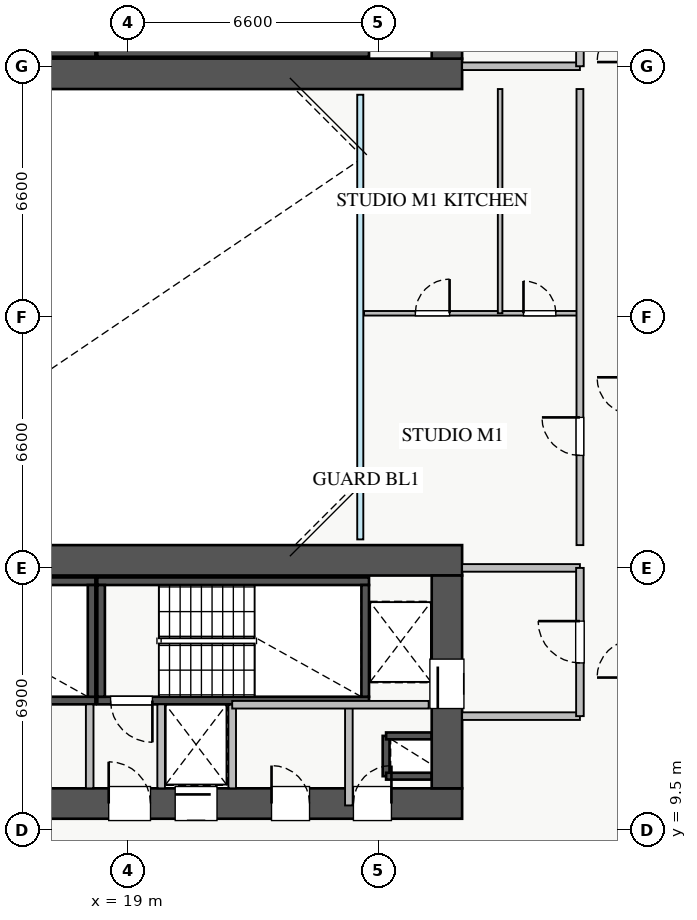
"""IFC4 building model, lengths in metres.
Left out: names, types, materials, properties, quantities, classifications, styles, units other than length and angle.
Written with IfcOpenShell. Run it as: python <this file> out.ifc"""

import sys

from ifc_helpers import new_model, si_unit, direction, frame, frame_2d, origin, place, context, subcontext, project, spatial, rectangle, extrude, source, transform, mapped, element, fill, save


model = new_model("IFC4")
c1 = context("Model", 3, precision=1e-05, world=origin(), true_north=direction((0.0, 1.0)))
c2 = subcontext(c1, "Body", "Model", "MODEL_VIEW")
j1 = project(units=[si_unit("LENGTHUNIT", "METRE"), si_unit("PLANEANGLEUNIT", "RADIAN")], contexts=[c1])
p1 = place(None, origin())
s1 = spatial("IfcSite", under=j1, at=p1, CompositionType="ELEMENT")
p2 = place(p1, origin())
s2 = spatial("IfcBuilding", under=s1, at=p2, CompositionType="ELEMENT")
p3 = place(p2, frame((0.0, 0.0, 39.25)))
s3 = spatial("IfcBuildingStorey", under=s2, at=p3, CompositionType="ELEMENT", Elevation=39.25)
p4 = place(p3, frame((25.8, 10.92, 0.0), z_axis=(0.0, 0.0, 1.0), x_axis=(0.0, 1.0, 0.0)))
e1 = element("IfcWall", 1, at=p4, inside=s3, PredefinedType="SHEAR", context=c2, shape_type="SweptSolid", body=[
    extrude(rectangle(XDim=1.06, YDim=0.18, at=frame_2d((0.53, 0.0))), origin(), (0.0, 0.0, 1.0), 3.07),
])
for number, where, z_axis, x_axis in (
    (2, (25.8, 11.98, 0.0), (0.0, 0.0, 1.0), (1.0, 0.0, 0.0)),
    (3, (25.8, 10.92, 0.0), (0.0, 0.0, 1.0), (1.0, 0.0, 0.0)),
):
    element("IfcWall", number, at=place(p3, frame(where, z_axis=z_axis, x_axis=x_axis)), inside=s3, PredefinedType="SHEAR", context=c2, shape_type="SweptSolid", body=[
        extrude(rectangle(XDim=1.2, YDim=0.18, at=frame_2d((0.6, 0.0))), origin(), (0.0, 0.0, 1.0), 3.07),
    ])
p5 = place(p3, frame((19.88, 12.8, 0.0), z_axis=(0.0, 0.0, 1.0), x_axis=(1.0, 0.0, 0.0)))
e4 = element("IfcWall", 4, at=p5, inside=s3, PredefinedType="SHEAR", context=c2, shape_type="SweptSolid", body=[
    extrude(rectangle(XDim=1.87, YDim=0.18, at=frame_2d((0.935, 0.0))), origin(), (0.0, 0.0, 1.0), 3.07),
])
p6 = place(p3, frame((11.0, 29.95, 0.0), z_axis=(0.0, 0.0, 1.0), x_axis=(1.0, 0.0, 0.0)))
e5 = element("IfcWall", 5, at=p6, inside=s3, PredefinedType="SHEAR", context=c2, shape_type="SweptSolid", body=[
    extrude(rectangle(XDim=7.15, YDim=0.2, at=frame_2d((3.575, 0.0))), origin(), (0.0, 0.0, 1.0), 3.25),
])
p7 = place(p3, frame((18.2, 29.95, 0.0), z_axis=(0.0, 0.0, 1.0), x_axis=(1.0, 0.0, 0.0)))
e6 = element("IfcWall", 6, at=p7, inside=s3, PredefinedType="SHEAR", context=c2, shape_type="SweptSolid", body=[
    extrude(rectangle(XDim=7.15, YDim=0.2, at=frame_2d((3.575, 0.0))), origin(), (0.0, 0.0, 1.0), 3.25),
])
p8 = place(p3, frame((11.0, 12.91, 0.0), z_axis=(0.0, 0.0, 1.0), x_axis=(1.0, 0.0, 0.0)))
e7 = element("IfcWall", 7, at=p8, inside=s3, PredefinedType="SHEAR", context=c2, shape_type="SweptSolid", body=[
    extrude(rectangle(XDim=7.15, YDim=0.2, at=frame_2d((3.575, 0.0))), origin(), (0.0, 0.0, 1.0), 3.25),
])
p9 = place(p8, frame((0.35, 0.0, 0.0)))
e8 = element("IfcOpeningElement", 8, at=p9, cuts=e7, PredefinedType="OPENING", context=c2, shape_type="SweptSolid", body=[
    extrude(rectangle(XDim=1.1, YDim=2.05, at=frame_2d((0.55, 1.025))), frame((0.0, 0.11, 0.0), z_axis=(0.0, -1.0, 0.0), x_axis=(1.0, 0.0, 0.0)), (0.0, 0.0, 1.0), 0.22),
])
p10 = place(p3, frame((11.0, 16.05, 0.0), z_axis=(0.0, 0.0, 1.0), x_axis=(1.0, 0.0, 0.0)))
e9 = element("IfcWall", 9, at=p10, inside=s3, PredefinedType="SHEAR", context=c2, shape_type="SweptSolid", body=[
    extrude(rectangle(XDim=7.15, YDim=0.2, at=frame_2d((3.575, 0.0))), origin(), (0.0, 0.0, 1.0), 3.25),
])
p11 = place(p3, frame((18.05, 13.01, 0.0), z_axis=(0.0, 0.0, 1.0), x_axis=(0.0, 1.0, 0.0)))
e10 = element("IfcWall", 10, at=p11, inside=s3, PredefinedType="SHEAR", context=c2, shape_type="SweptSolid", body=[
    extrude(rectangle(XDim=2.94, YDim=0.2, at=frame_2d((1.47, 0.0))), origin(), (0.0, 0.0, 1.0), 3.25),
])
p12 = place(p3, frame((18.2, 12.91, 0.0), z_axis=(0.0, 0.0, 1.0), x_axis=(1.0, 0.0, 0.0)))
e11 = element("IfcWall", 11, at=p12, inside=s3, PredefinedType="SHEAR", context=c2, shape_type="SweptSolid", body=[
    extrude(rectangle(XDim=7.15, YDim=0.2, at=frame_2d((3.575, 0.0))), origin(), (0.0, 0.0, 1.0), 3.25),
])
p13 = place(p12, frame((0.35, 0.0, 0.0)))
e12 = element("IfcOpeningElement", 12, at=p13, cuts=e11, PredefinedType="OPENING", context=c2, shape_type="SweptSolid", body=[
    extrude(rectangle(XDim=1.1, YDim=2.05, at=frame_2d((0.55, 1.025))), frame((0.0, 0.11, 0.0), z_axis=(0.0, -1.0, 0.0), x_axis=(1.0, 0.0, 0.0)), (0.0, 0.0, 1.0), 0.22),
])
p14 = place(p3, frame((18.2, 16.05, 0.0), z_axis=(0.0, 0.0, 1.0), x_axis=(1.0, 0.0, 0.0)))
e13 = element("IfcWall", 13, at=p14, inside=s3, PredefinedType="SHEAR", context=c2, shape_type="SweptSolid", body=[
    extrude(rectangle(XDim=7.15, YDim=0.2, at=frame_2d((3.575, 0.0))), origin(), (0.0, 0.0, 1.0), 3.25),
])
for number, where, z_axis, x_axis in (
    (14, (18.3, 13.01, 0.0), (0.0, 0.0, 1.0), (0.0, 1.0, 0.0)),
    (15, (25.25, 13.01, 0.0), (0.0, 0.0, 1.0), (0.0, 1.0, 0.0)),
):
    element("IfcWall", number, at=place(p3, frame(where, z_axis=z_axis, x_axis=x_axis)), inside=s3, PredefinedType="SHEAR", context=c2, shape_type="SweptSolid", body=[
        extrude(rectangle(XDim=2.94, YDim=0.2, at=frame_2d((1.47, 0.0))), origin(), (0.0, 0.0, 1.0), 3.25),
    ])
p15 = place(p3, frame((10.2, 29.4, 0.0), z_axis=(0.0, 0.0, 1.0), x_axis=(1.0, 0.0, 0.0)))
e16 = element("IfcWall", 16, at=p15, inside=s3, PredefinedType="SHEAR", context=c2, shape_type="SweptSolid", body=[
    extrude(rectangle(XDim=17.6, YDim=0.8, at=frame_2d((8.8, 0.0))), origin(), (0.0, 0.0, 1.0), 3.25),
])
p16 = place(p3, frame((27.4, 29.8, 0.0), z_axis=(0.0, 0.0, 1.0), x_axis=(0.0, 1.0, 0.0)))
e17 = element("IfcWall", 17, at=p16, inside=s3, PredefinedType="SHEAR", context=c2, shape_type="SweptSolid", body=[
    extrude(rectangle(XDim=5.6, YDim=0.8, at=frame_2d((2.8, 0.0))), origin(), (0.0, 0.0, 1.0), 3.25),
])
p17 = place(p16, frame((1.1, 0.0, 0.0)))
e18 = element("IfcOpeningElement", 18, at=p17, cuts=e17, PredefinedType="OPENING", context=c2, shape_type="SweptSolid", body=[
    extrude(rectangle(XDim=1.3, YDim=2.05, at=frame_2d((0.65, 1.025))), frame((0.0, 0.41, 0.0), z_axis=(0.0, -1.0, 0.0), x_axis=(1.0, 0.0, 0.0)), (0.0, 0.0, 1.0), 0.82),
])
p18 = place(p3, frame((10.2, 10.2, 0.0), z_axis=(0.0, 0.0, 1.0), x_axis=(1.0, 0.0, 0.0)))
e19 = element("IfcWall", 19, at=p18, inside=s3, PredefinedType="SHEAR", context=c2, shape_type="SweptSolid", body=[
    extrude(rectangle(XDim=17.6, YDim=0.8, at=frame_2d((8.8, 0.0))), origin(), (0.0, 0.0, 1.0), 3.25),
])
p19 = place(p18, frame((1.15, 0.0, 0.0)))
e20 = element("IfcOpeningElement", 20, at=p19, cuts=e19, PredefinedType="OPENING", context=c2, shape_type="SweptSolid", body=[
    extrude(rectangle(XDim=1.1, YDim=2.05, at=frame_2d((0.55, 1.025))), frame((0.0, 0.41, 0.0), z_axis=(0.0, -1.0, 0.0), x_axis=(1.0, 0.0, 0.0)), (0.0, 0.0, 1.0), 0.82),
])
p20 = place(p18, frame((8.3, 0.0, 0.0)))
e21 = element("IfcOpeningElement", 21, at=p20, cuts=e19, PredefinedType="OPENING", context=c2, shape_type="SweptSolid", body=[
    extrude(rectangle(XDim=1.1, YDim=2.05, at=frame_2d((0.55, 1.025))), frame((0.0, 0.41, 0.0), z_axis=(0.0, -1.0, 0.0), x_axis=(1.0, 0.0, 0.0)), (0.0, 0.0, 1.0), 0.82),
])
p21 = place(p18, frame((10.05, 0.0, 0.0)))
e22 = element("IfcOpeningElement", 22, at=p21, cuts=e19, PredefinedType="OPENING", context=c2, shape_type="SweptSolid", body=[
    extrude(rectangle(XDim=1.1, YDim=2.05, at=frame_2d((0.55, 1.025))), frame((0.0, 0.41, 0.0), z_axis=(0.0, -1.0, 0.0), x_axis=(1.0, 0.0, 0.0)), (0.0, 0.0, 1.0), 0.82),
])
p22 = place(p18, frame((14.74, 0.0, 0.0)))
e23 = element("IfcOpeningElement", 23, at=p22, cuts=e19, PredefinedType="OPENING", context=c2, shape_type="SweptSolid", body=[
    extrude(rectangle(XDim=1.0, YDim=2.05, at=frame_2d((0.5, 1.025))), frame((0.0, 0.41, 0.0), z_axis=(0.0, -1.0, 0.0), x_axis=(1.0, 0.0, 0.0)), (0.0, 0.0, 1.0), 0.82),
])
p23 = place(p18, frame((12.585, 0.0, 0.0)))
e24 = element("IfcOpeningElement", 24, at=p23, cuts=e19, PredefinedType="OPENING", context=c2, shape_type="SweptSolid", body=[
    extrude(rectangle(XDim=1.0, YDim=2.05, at=frame_2d((0.5, 1.025))), frame((0.0, 0.41, 0.0), z_axis=(0.0, -1.0, 0.0), x_axis=(1.0, 0.0, 0.0)), (0.0, 0.0, 1.0), 0.82),
])
p24 = place(p3, frame((10.2, 16.6, 0.0), z_axis=(0.0, 0.0, 1.0), x_axis=(1.0, 0.0, 0.0)))
e25 = element("IfcWall", 25, at=p24, inside=s3, PredefinedType="SHEAR", context=c2, shape_type="SweptSolid", body=[
    extrude(rectangle(XDim=17.6, YDim=0.8, at=frame_2d((8.8, 0.0))), origin(), (0.0, 0.0, 1.0), 3.25),
])
p25 = place(p3, frame((27.4, 10.6, 0.0), z_axis=(0.0, 0.0, 1.0), x_axis=(0.0, 1.0, 0.0)))
e26 = element("IfcWall", 26, at=p25, inside=s3, PredefinedType="SHEAR", context=c2, shape_type="SweptSolid", body=[
    extrude(rectangle(XDim=5.6, YDim=0.8, at=frame_2d((2.8, 0.0))), origin(), (0.0, 0.0, 1.0), 3.25),
])
p26 = place(p25, frame((2.1, 0.0, 0.0)))
e27 = element("IfcOpeningElement", 27, at=p26, cuts=e26, PredefinedType="OPENING", context=c2, shape_type="SweptSolid", body=[
    extrude(rectangle(XDim=1.3, YDim=2.05, at=frame_2d((0.65, 1.025))), frame((0.0, 0.41, 0.0), z_axis=(0.0, -1.0, 0.0), x_axis=(1.0, 0.0, 0.0)), (0.0, 0.0, 1.0), 0.82),
])
p27 = place(p3, frame((27.8, 29.6, 0.0), z_axis=(0.0, 0.0, 1.0), x_axis=(1.0, 0.0, 0.0)))
e28 = element("IfcWall", 28, at=p27, inside=s3, PredefinedType="PARTITIONING", context=c2, shape_type="SweptSolid", body=[
    extrude(rectangle(XDim=3.1, YDim=0.2, at=frame_2d((1.55, 0.0))), origin(), (0.0, 0.0, 1.0), 3.07),
])
p28 = place(p3, frame((30.9, 29.6, 0.0), z_axis=(0.0, 0.0, 1.0), x_axis=(0.0, 1.0, 0.0)))
e29 = element("IfcWall", 29, at=p28, inside=s3, PredefinedType="PARTITIONING", context=c2, shape_type="SweptSolid", body=[
    extrude(rectangle(XDim=3.9, YDim=0.2, at=frame_2d((1.95, 0.0))), origin(), (0.0, 0.0, 1.0), 3.07),
])
p29 = place(p28, frame((1.4, 0.0, 0.0)))
e30 = element("IfcOpeningElement", 30, at=p29, cuts=e29, PredefinedType="OPENING", context=c2, shape_type="SweptSolid", body=[
    extrude(rectangle(XDim=1.1, YDim=2.05, at=frame_2d((0.55, 1.025))), frame((0.0, 0.11, 0.0), z_axis=(0.0, -1.0, 0.0), x_axis=(1.0, 0.0, 0.0)), (0.0, 0.0, 1.0), 0.22),
])
for number, where, z_axis, x_axis in (
    (31, (27.8, 16.4, 0.0), (0.0, 0.0, 1.0), (1.0, 0.0, 0.0)),
    (32, (27.8, 12.5, 0.0), (0.0, 0.0, 1.0), (1.0, 0.0, 0.0)),
):
    element("IfcWall", number, at=place(p3, frame(where, z_axis=z_axis, x_axis=x_axis)), inside=s3, PredefinedType="PARTITIONING", context=c2, shape_type="SweptSolid", body=[
        extrude(rectangle(XDim=3.1, YDim=0.2, at=frame_2d((1.55, 0.0))), origin(), (0.0, 0.0, 1.0), 3.07),
    ])
p30 = place(p3, frame((30.9, 12.5, 0.0), z_axis=(0.0, 0.0, 1.0), x_axis=(0.0, 1.0, 0.0)))
e33 = element("IfcWall", 33, at=p30, inside=s3, PredefinedType="PARTITIONING", context=c2, shape_type="SweptSolid", body=[
    extrude(rectangle(XDim=3.9, YDim=0.2, at=frame_2d((1.95, 0.0))), origin(), (0.0, 0.0, 1.0), 3.07),
])
p31 = place(p30, frame((1.4, 0.0, 0.0)))
e34 = element("IfcOpeningElement", 34, at=p31, cuts=e33, PredefinedType="OPENING", context=c2, shape_type="SweptSolid", body=[
    extrude(rectangle(XDim=1.1, YDim=2.05, at=frame_2d((0.55, 1.025))), frame((0.0, 0.11, 0.0), z_axis=(0.0, -1.0, 0.0), x_axis=(1.0, 0.0, 0.0)), (0.0, 0.0, 1.0), 0.22),
])
for number, where, z_axis, x_axis in (
    (35, (18.0, 10.6, 0.0), (0.0, 0.0, 1.0), (0.0, 1.0, 0.0)),
    (36, (19.88, 10.6, 0.0), (0.0, 0.0, 1.0), (0.0, 1.0, 0.0)),
):
    element("IfcWall", number, at=place(p3, frame(where, z_axis=z_axis, x_axis=x_axis)), inside=s3, PredefinedType="PARTITIONING", context=c2, shape_type="SweptSolid", body=[
        extrude(rectangle(XDim=2.21, YDim=0.2, at=frame_2d((1.105, 0.0))), origin(), (0.0, 0.0, 1.0), 3.07),
    ])
p32 = place(p3, frame((24.82, 10.15, 0.0), z_axis=(0.0, 0.0, 1.0), x_axis=(0.0, 1.0, 0.0)))
e37 = element("IfcWall", 37, at=p32, inside=s3, PredefinedType="PARTITIONING", context=c2, shape_type="SweptSolid", body=[
    extrude(rectangle(XDim=2.65, YDim=0.2, at=frame_2d((1.325, 0.0))), origin(), (0.0, 0.0, 1.0), 3.07),
])
p33 = place(p3, frame((21.75, 10.6, 0.0), z_axis=(0.0, 0.0, 1.0), x_axis=(0.0, 1.0, 0.0)))
e38 = element("IfcWall", 38, at=p33, inside=s3, PredefinedType="PARTITIONING", context=c2, shape_type="SweptSolid", body=[
    extrude(rectangle(XDim=2.2, YDim=0.2, at=frame_2d((1.1, 0.0))), origin(), (0.0, 0.0, 1.0), 3.07),
])
p34 = place(p3, frame((21.75, 12.8, 0.0), z_axis=(0.0, 0.0, 1.0), x_axis=(1.0, 0.0, 0.0)))
e39 = element("IfcWall", 39, at=p34, inside=s3, PredefinedType="PARTITIONING", context=c2, shape_type="SweptSolid", body=[
    extrude(rectangle(XDim=5.17, YDim=0.2, at=frame_2d((2.585, 0.0))), origin(), (0.0, 0.0, 1.0), 3.07),
])
p35 = place(p3, frame((25.22, 23.1, 0.0), z_axis=(0.0, 0.0, 1.0), x_axis=(1.0, 0.0, 0.0)))
e40 = element("IfcWall", 40, at=p35, inside=s3, PredefinedType="PLUMBINGWALL", context=c2, shape_type="SweptSolid", body=[
    extrude(rectangle(XDim=5.68, YDim=0.12, at=frame_2d((2.84, 0.0))), origin(), (0.0, 0.0, 1.0), 3.07),
])
p36 = place(p35, frame((1.35, 0.0, 0.0)))
e41 = element("IfcOpeningElement", 41, at=p36, cuts=e40, PredefinedType="OPENING", context=c2, shape_type="SweptSolid", body=[
    extrude(rectangle(XDim=0.9, YDim=2.05, at=frame_2d((0.45, 1.025))), frame((0.0, 0.07, 0.0), z_axis=(0.0, -1.0, 0.0), x_axis=(1.0, 0.0, 0.0)), (0.0, 0.0, 1.0), 0.14),
])
p37 = place(p35, frame((4.195, 0.0, 0.0)))
e42 = element("IfcOpeningElement", 42, at=p37, cuts=e40, PredefinedType="OPENING", context=c2, shape_type="SweptSolid", body=[
    extrude(rectangle(XDim=0.85, YDim=2.05, at=frame_2d((0.425, 1.025))), frame((0.0, 0.07, 0.0), z_axis=(0.0, -1.0, 0.0), x_axis=(1.0, 0.0, 0.0)), (0.0, 0.0, 1.0), 0.14),
])
p38 = place(p3, frame((28.8, 23.1, 0.0), z_axis=(0.0, 0.0, 1.0), x_axis=(0.0, 1.0, 0.0)))
e43 = element("IfcWall", 43, at=p38, inside=s3, PredefinedType="PLUMBINGWALL", context=c2, shape_type="SweptSolid", body=[
    extrude(rectangle(XDim=5.9, YDim=0.12, at=frame_2d((2.95, 0.0))), origin(), (0.0, 0.0, 1.0), 3.07),
])
p39 = place(p3, frame((30.9, 17.0, 0.0), z_axis=(0.0, 0.0, 1.0), x_axis=(0.0, 1.0, 0.0)))
e44 = element("IfcWall", 44, at=p39, inside=s3, PredefinedType="PARTITIONING", context=c2, shape_type="SweptSolid", body=[
    extrude(rectangle(XDim=12.0, YDim=0.18, at=frame_2d((6.0, 0.0))), origin(), (0.0, 0.0, 1.0), 3.07),
])
p40 = place(p39, frame((2.36, 0.0, 0.0)))
e45 = element("IfcOpeningElement", 45, at=p40, cuts=e44, PredefinedType="OPENING", context=c2, shape_type="SweptSolid", body=[
    extrude(rectangle(XDim=1.0, YDim=2.05, at=frame_2d((0.5, 1.025))), frame((0.0, 0.1, 0.0), z_axis=(0.0, -1.0, 0.0), x_axis=(1.0, 0.0, 0.0)), (0.0, 0.0, 1.0), 0.2),
])
m1 = source(origin(), c2, "Body", "SweptSolid", [
    extrude(rectangle(XDim=1.3, YDim=2.05, at=frame_2d((0.65, 1.025))), frame((0.0, 0.025, 0.0), z_axis=(0.0, -1.0, 0.0), x_axis=(1.0, 0.0, 0.0)), (0.0, 0.0, 1.0), 0.05),
])
p41 = place(p26, origin())
e46 = element("IfcDoor", 46, at=p41, inside=s3, OperationType="SLIDING_TO_RIGHT", PredefinedType="DOOR", context=c2, shape_type="MappedRepresentation", body=[
    mapped(m1, transform((0.0, 0.0, 0.0), x_axis=(1.0, 0.0, 0.0), y_axis=(0.0, 1.0, 0.0), z_axis=(0.0, 0.0, 1.0), scale=1.0)),
])
fill(e27, e46)
m2 = source(origin(), c2, "Body", "SweptSolid", [
    extrude(rectangle(XDim=1.1, YDim=2.05, at=frame_2d((0.55, 1.025))), frame((0.0, 0.025, 0.0), z_axis=(0.0, -1.0, 0.0), x_axis=(1.0, 0.0, 0.0)), (0.0, 0.0, 1.0), 0.05),
])
p42 = place(p20, origin())
e47 = element("IfcDoor", 47, at=p42, inside=s3, OperationType="SINGLE_SWING_LEFT", PredefinedType="DOOR", context=c2, shape_type="MappedRepresentation", body=[
    mapped(m2, transform((0.0, 0.0, 0.0), x_axis=(1.0, 0.0, 0.0), y_axis=(0.0, 1.0, 0.0), z_axis=(0.0, 0.0, 1.0), scale=1.0)),
])
fill(e21, e47)
p43 = place(p13, frame((1.1, 0.0, 0.0), z_axis=(0.0, 0.0, 1.0), x_axis=(-1.0, 0.0, 0.0)))
e48 = element("IfcDoor", 48, at=p43, inside=s3, OperationType="SINGLE_SWING_RIGHT", PredefinedType="DOOR", context=c2, shape_type="MappedRepresentation", body=[
    mapped(m2, transform((0.0, 0.0, 0.0), x_axis=(1.0, 0.0, 0.0), y_axis=(0.0, 1.0, 0.0), z_axis=(0.0, 0.0, 1.0), scale=1.0)),
])
fill(e12, e48)
p44 = place(p21, origin())
e49 = element("IfcDoor", 49, at=p44, inside=s3, OperationType="SLIDING_TO_RIGHT", PredefinedType="DOOR", context=c2, shape_type="MappedRepresentation", body=[
    mapped(m2, transform((0.0, 0.0, 0.0), x_axis=(1.0, 0.0, 0.0), y_axis=(0.0, 1.0, 0.0), z_axis=(0.0, 0.0, 1.0), scale=1.0)),
])
fill(e22, e49)
m3 = source(origin(), c2, "Body", "SweptSolid", [
    extrude(rectangle(XDim=1.0, YDim=2.05, at=frame_2d((0.5, 1.025))), frame((0.0, 0.025, 0.0), z_axis=(0.0, -1.0, 0.0), x_axis=(1.0, 0.0, 0.0)), (0.0, 0.0, 1.0), 0.05),
])
p45 = place(p22, origin())
e50 = element("IfcDoor", 50, at=p45, inside=s3, OperationType="SINGLE_SWING_RIGHT", PredefinedType="DOOR", context=c2, shape_type="MappedRepresentation", body=[
    mapped(m3, transform((0.0, 0.0, 0.0), x_axis=(1.0, 0.0, 0.0), y_axis=(0.0, 1.0, 0.0), z_axis=(0.0, 0.0, 1.0), scale=1.0)),
])
fill(e23, e50)
p46 = place(p23, origin())
e51 = element("IfcDoor", 51, at=p46, inside=s3, OperationType="SINGLE_SWING_LEFT", PredefinedType="DOOR", context=c2, shape_type="MappedRepresentation", body=[
    mapped(m3, transform((0.0, 0.0, 0.0), x_axis=(1.0, 0.0, 0.0), y_axis=(0.0, 1.0, 0.0), z_axis=(0.0, 0.0, 1.0), scale=1.0)),
])
fill(e24, e51)
p47 = place(p31, origin())
e52 = element("IfcDoor", 52, at=p47, inside=s3, OperationType="SINGLE_SWING_RIGHT", PredefinedType="DOOR", context=c2, shape_type="MappedRepresentation", body=[
    mapped(m2, transform((0.0, 0.0, 0.0), x_axis=(1.0, 0.0, 0.0), y_axis=(0.0, 1.0, 0.0), z_axis=(0.0, 0.0, 1.0), scale=1.0)),
])
fill(e34, e52)
m4 = source(origin(), c2, "Body", "SweptSolid", [
    extrude(rectangle(XDim=0.9, YDim=2.05, at=frame_2d((0.45, 1.025))), frame((0.0, 0.025, 0.0), z_axis=(0.0, -1.0, 0.0), x_axis=(1.0, 0.0, 0.0)), (0.0, 0.0, 1.0), 0.05),
])
p48 = place(p36, origin())
e53 = element("IfcDoor", 53, at=p48, inside=s3, OperationType="SINGLE_SWING_RIGHT", PredefinedType="DOOR", context=c2, shape_type="MappedRepresentation", body=[
    mapped(m4, transform((0.0, 0.0, 0.0), x_axis=(1.0, 0.0, 0.0), y_axis=(0.0, 1.0, 0.0), z_axis=(0.0, 0.0, 1.0), scale=1.0)),
])
fill(e41, e53)
m5 = source(origin(), c2, "Body", "SweptSolid", [
    extrude(rectangle(XDim=0.85, YDim=2.05, at=frame_2d((0.425, 1.025))), frame((0.0, 0.025, 0.0), z_axis=(0.0, -1.0, 0.0), x_axis=(1.0, 0.0, 0.0)), (0.0, 0.0, 1.0), 0.05),
])
p49 = place(p37, origin())
e54 = element("IfcDoor", 54, at=p49, inside=s3, OperationType="SINGLE_SWING_LEFT", PredefinedType="DOOR", context=c2, shape_type="MappedRepresentation", body=[
    mapped(m5, transform((0.0, 0.0, 0.0), x_axis=(1.0, 0.0, 0.0), y_axis=(0.0, 1.0, 0.0), z_axis=(0.0, 0.0, 1.0), scale=1.0)),
])
fill(e42, e54)
p50 = place(p40, origin())
e55 = element("IfcDoor", 55, at=p50, inside=s3, OperationType="SINGLE_SWING_RIGHT", PredefinedType="DOOR", context=c2, shape_type="MappedRepresentation", body=[
    mapped(m3, transform((0.0, 0.0, 0.0), x_axis=(1.0, 0.0, 0.0), y_axis=(0.0, 1.0, 0.0), z_axis=(0.0, 0.0, 1.0), scale=1.0)),
])
fill(e45, e55)
save(model, sys.argv[1])
